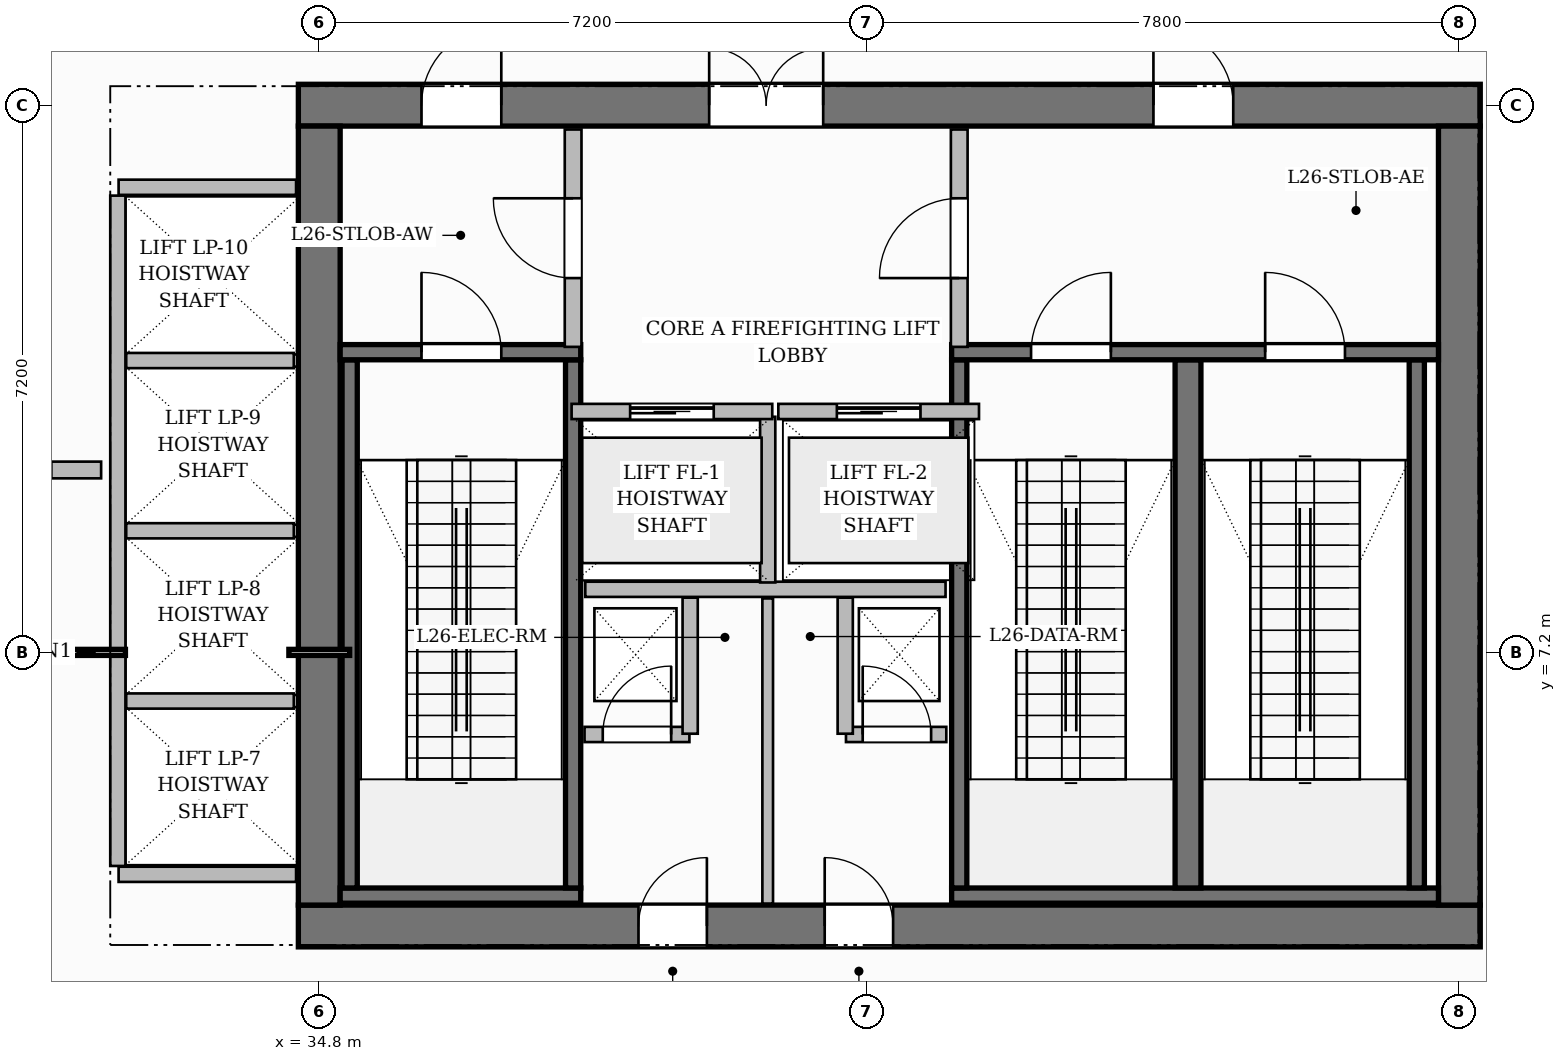
"""IFC4 building model, lengths in metres.
Left out: names, types, materials, properties, quantities, classifications, styles, units other than length and angle.
Written with IfcOpenShell. Run it as: python <this file> out.ifc"""

import sys

from ifc_helpers import new_model, si_unit, direction, frame, frame_2d, origin, place, context, subcontext, project, spatial, rectangle, extrude, source, transform, mapped, element, fill, save


model = new_model("IFC4")
c1 = context("Model", 3, precision=1e-05, world=origin(), true_north=direction((0.0, 1.0)))
c2 = subcontext(c1, "Body", "Model", "MODEL_VIEW")
j1 = project(units=[si_unit("LENGTHUNIT", "METRE"), si_unit("PLANEANGLEUNIT", "RADIAN")], contexts=[c1])
p1 = place(None, origin())
s1 = spatial("IfcSite", under=j1, at=p1, CompositionType="ELEMENT")
p2 = place(p1, origin())
s2 = spatial("IfcBuilding", under=s1, at=p2, CompositionType="ELEMENT")
p3 = place(p2, frame((0.0, 0.0, 106.4)))
s3 = spatial("IfcBuildingStorey", under=s2, at=p3, CompositionType="ELEMENT", Elevation=106.4)
p4 = place(p3, frame((34.525, 3.6, 0.0), z_axis=(0.0, 0.0, 1.0), x_axis=(1.0, 0.0, 0.0)))
e1 = element("IfcWall", 1, at=p4, inside=s3, PredefinedType="SHEAR", context=c2, shape_type="SweptSolid", body=[
    extrude(rectangle(XDim=15.55, YDim=0.55, at=frame_2d((7.775, 0.0))), origin(), (0.0, 0.0, 1.0), 5.4),
])
p5 = place(p4, frame((4.475, 0.0, 0.0)))
e2 = element("IfcOpeningElement", 2, at=p5, cuts=e1, PredefinedType="OPENING", context=c2, shape_type="SweptSolid", body=[
    extrude(rectangle(XDim=0.9, YDim=2.1, at=frame_2d((0.45, 1.05))), frame((0.0, 0.285, 0.0), z_axis=(0.0, -1.0, 0.0), x_axis=(1.0, 0.0, 0.0)), (0.0, 0.0, 1.0), 0.57),
])
p6 = place(p4, frame((6.925, 0.0, 0.0)))
e3 = element("IfcOpeningElement", 3, at=p6, cuts=e1, PredefinedType="OPENING", context=c2, shape_type="SweptSolid", body=[
    extrude(rectangle(XDim=0.9, YDim=2.1, at=frame_2d((0.45, 1.05))), frame((0.0, 0.285, 0.0), z_axis=(0.0, -1.0, 0.0), x_axis=(1.0, 0.0, 0.0)), (0.0, 0.0, 1.0), 0.57),
])
p7 = place(p3, frame((34.525, 14.4, 0.0), z_axis=(0.0, 0.0, 1.0), x_axis=(1.0, 0.0, 0.0)))
e4 = element("IfcWall", 4, at=p7, inside=s3, PredefinedType="SHEAR", context=c2, shape_type="SweptSolid", body=[
    extrude(rectangle(XDim=15.55, YDim=0.55, at=frame_2d((7.775, 0.0))), origin(), (0.0, 0.0, 1.0), 5.4),
])
p8 = place(p7, frame((5.405, 0.0, 0.0)))
e5 = element("IfcOpeningElement", 5, at=p8, cuts=e4, PredefinedType="OPENING", context=c2, shape_type="SweptSolid", body=[
    extrude(rectangle(XDim=1.5, YDim=2.2, at=frame_2d((0.75, 1.1))), frame((0.0, 0.285, 0.0), z_axis=(0.0, -1.0, 0.0), x_axis=(1.0, 0.0, 0.0)), (0.0, 0.0, 1.0), 0.57),
])
p9 = place(p7, frame((1.62, 0.0, 0.0)))
e6 = element("IfcOpeningElement", 6, at=p9, cuts=e4, PredefinedType="OPENING", context=c2, shape_type="SweptSolid", body=[
    extrude(rectangle(XDim=1.05, YDim=2.15, at=frame_2d((0.525, 1.075))), frame((0.0, 0.285, 0.0), z_axis=(0.0, -1.0, 0.0), x_axis=(1.0, 0.0, 0.0)), (0.0, 0.0, 1.0), 0.57),
])
p10 = place(p7, frame((11.25, 0.0, 0.0)))
e7 = element("IfcOpeningElement", 7, at=p10, cuts=e4, PredefinedType="OPENING", context=c2, shape_type="SweptSolid", body=[
    extrude(rectangle(XDim=1.05, YDim=2.15, at=frame_2d((0.525, 1.075))), frame((0.0, 0.285, 0.0), z_axis=(0.0, -1.0, 0.0), x_axis=(1.0, 0.0, 0.0)), (0.0, 0.0, 1.0), 0.57),
])
for number, where, z_axis, x_axis in (
    (8, (34.8, 3.875, 0.0), (0.0, 0.0, 1.0), (0.0, 1.0, 0.0)),
    (9, (49.8, 3.875, 0.0), (0.0, 0.0, 1.0), (0.0, 1.0, 0.0)),
):
    element("IfcWall", number, at=place(p3, frame(where, z_axis=z_axis, x_axis=x_axis)), inside=s3, PredefinedType="SHEAR", context=c2, shape_type="SweptSolid", body=[
        extrude(rectangle(XDim=10.25, YDim=0.55, at=frame_2d((5.125, 0.0))), origin(), (0.0, 0.0, 1.0), 5.4),
    ])
p11 = place(p3, frame((35.075, 4.0, 0.0), z_axis=(0.0, 0.0, 1.0), x_axis=(1.0, 0.0, 0.0)))
e10 = element("IfcWall", 10, at=p11, inside=s3, PredefinedType="SHEAR", context=c2, shape_type="SweptSolid", body=[
    extrude(rectangle(XDim=3.165, YDim=0.2, at=frame_2d((1.583, 0.0))), origin(), (0.0, 0.0, 1.0), 5.4),
])
for number, where, z_axis, x_axis in (
    (11, (35.2, 4.1, 0.0), (0.0, 0.0, 1.0), (0.0, 1.0, 0.0)),
    (12, (38.14, 4.1, 0.0), (0.0, 0.0, 1.0), (0.0, 1.0, 0.0)),
):
    element("IfcWall", number, at=place(p3, frame(where, z_axis=z_axis, x_axis=x_axis)), inside=s3, PredefinedType="SHEAR", context=c2, shape_type="SweptSolid", body=[
        extrude(rectangle(XDim=6.95, YDim=0.2, at=frame_2d((3.475, 0.0))), origin(), (0.0, 0.0, 1.0), 5.4),
    ])
p12 = place(p3, frame((35.075, 11.15, 0.0), z_axis=(0.0, 0.0, 1.0), x_axis=(1.0, 0.0, 0.0)))
e13 = element("IfcWall", 13, at=p12, inside=s3, PredefinedType="SHEAR", context=c2, shape_type="SweptSolid", body=[
    extrude(rectangle(XDim=3.165, YDim=0.2, at=frame_2d((1.583, 0.0))), origin(), (0.0, 0.0, 1.0), 5.4),
])
p13 = place(p12, frame((1.07, 0.0, 0.0)))
e14 = element("IfcOpeningElement", 14, at=p13, cuts=e13, PredefinedType="OPENING", context=c2, shape_type="SweptSolid", body=[
    extrude(rectangle(XDim=1.05, YDim=2.2, at=frame_2d((0.525, 1.1))), frame((0.0, 0.11, 0.0), z_axis=(0.0, -1.0, 0.0), x_axis=(1.0, 0.0, 0.0)), (0.0, 0.0, 1.0), 0.22),
])
p14 = place(p3, frame((43.12, 4.0, 0.0), z_axis=(0.0, 0.0, 1.0), x_axis=(1.0, 0.0, 0.0)))
e15 = element("IfcWall", 15, at=p14, inside=s3, PredefinedType="SHEAR", context=c2, shape_type="SweptSolid", body=[
    extrude(rectangle(XDim=6.405, YDim=0.2, at=frame_2d((3.202, 0.0))), origin(), (0.0, 0.0, 1.0), 5.4),
])
p15 = place(p3, frame((43.22, 4.1, 0.0), z_axis=(0.0, 0.0, 1.0), x_axis=(0.0, 1.0, 0.0)))
e16 = element("IfcWall", 16, at=p15, inside=s3, PredefinedType="SHEAR", context=c2, shape_type="SweptSolid", body=[
    extrude(rectangle(XDim=6.95, YDim=0.2, at=frame_2d((3.475, 0.0))), origin(), (0.0, 0.0, 1.0), 5.4),
])
p16 = place(p3, frame((46.23, 4.1, 0.0), z_axis=(0.0, 0.0, 1.0), x_axis=(0.0, 1.0, 0.0)))
e17 = element("IfcWall", 17, at=p16, inside=s3, PredefinedType="SHEAR", context=c2, shape_type="SweptSolid", body=[
    extrude(rectangle(XDim=6.95, YDim=0.34, at=frame_2d((3.475, 0.0))), origin(), (0.0, 0.0, 1.0), 5.4),
])
p17 = place(p3, frame((49.24, 4.1, 0.0), z_axis=(0.0, 0.0, 1.0), x_axis=(0.0, 1.0, 0.0)))
e18 = element("IfcWall", 18, at=p17, inside=s3, PredefinedType="SHEAR", context=c2, shape_type="SweptSolid", body=[
    extrude(rectangle(XDim=6.95, YDim=0.2, at=frame_2d((3.475, 0.0))), origin(), (0.0, 0.0, 1.0), 5.4),
])
p18 = place(p3, frame((43.12, 11.15, 0.0), z_axis=(0.0, 0.0, 1.0), x_axis=(1.0, 0.0, 0.0)))
e19 = element("IfcWall", 19, at=p18, inside=s3, PredefinedType="SHEAR", context=c2, shape_type="SweptSolid", body=[
    extrude(rectangle(XDim=6.405, YDim=0.2, at=frame_2d((3.202, 0.0))), origin(), (0.0, 0.0, 1.0), 5.4),
])
p19 = place(p18, frame((1.045, 0.0, 0.0)))
e20 = element("IfcOpeningElement", 20, at=p19, cuts=e19, PredefinedType="OPENING", context=c2, shape_type="SweptSolid", body=[
    extrude(rectangle(XDim=1.05, YDim=2.2, at=frame_2d((0.525, 1.1))), frame((0.0, 0.11, 0.0), z_axis=(0.0, -1.0, 0.0), x_axis=(1.0, 0.0, 0.0)), (0.0, 0.0, 1.0), 0.22),
])
p20 = place(p18, frame((4.125, 0.0, 0.0)))
e21 = element("IfcOpeningElement", 21, at=p20, cuts=e19, PredefinedType="OPENING", context=c2, shape_type="SweptSolid", body=[
    extrude(rectangle(XDim=1.05, YDim=2.2, at=frame_2d((0.525, 1.1))), frame((0.0, 0.11, 0.0), z_axis=(0.0, -1.0, 0.0), x_axis=(1.0, 0.0, 0.0)), (0.0, 0.0, 1.0), 0.22),
])
p21 = place(p3, frame((38.3, 8.03, 0.0), z_axis=(0.0, 0.0, 1.0), x_axis=(1.0, 0.0, 0.0)))
e22 = element("IfcWall", 22, at=p21, inside=s3, PredefinedType="PARTITIONING", context=c2, shape_type="SweptSolid", body=[
    extrude(rectangle(XDim=4.74, YDim=0.2, at=frame_2d((2.37, 0.0))), origin(), (0.0, 0.0, 1.0), 5.15),
])
p22 = place(p3, frame((40.7, 8.12, 0.0), z_axis=(0.0, 0.0, 1.0), x_axis=(0.0, 1.0, 0.0)))
e23 = element("IfcWall", 23, at=p22, inside=s3, PredefinedType="PARTITIONING", context=c2, shape_type="SweptSolid", body=[
    extrude(rectangle(XDim=2.18, YDim=0.2, at=frame_2d((1.09, 0.0))), origin(), (0.0, 0.0, 1.0), 5.15),
])
p23 = place(p3, frame((38.14, 11.22, 0.0), z_axis=(0.0, 0.0, 1.0), x_axis=(0.0, 1.0, 0.0)))
e24 = element("IfcWall", 24, at=p23, inside=s3, PredefinedType="PARTITIONING", context=c2, shape_type="SweptSolid", body=[
    extrude(rectangle(XDim=2.86, YDim=0.22, at=frame_2d((1.43, 0.0))), origin(), (0.0, 0.0, 1.0), 5.15),
])
p24 = place(p23, frame((0.905, 0.0, 0.0)))
e25 = element("IfcOpeningElement", 25, at=p24, cuts=e24, PredefinedType="OPENING", context=c2, shape_type="SweptSolid", body=[
    extrude(rectangle(XDim=1.05, YDim=2.15, at=frame_2d((0.525, 1.075))), frame((0.0, 0.12, 0.0), z_axis=(0.0, -1.0, 0.0), x_axis=(1.0, 0.0, 0.0)), (0.0, 0.0, 1.0), 0.24),
])
p25 = place(p3, frame((43.22, 11.22, 0.0), z_axis=(0.0, 0.0, 1.0), x_axis=(0.0, 1.0, 0.0)))
e26 = element("IfcWall", 26, at=p25, inside=s3, PredefinedType="PARTITIONING", context=c2, shape_type="SweptSolid", body=[
    extrude(rectangle(XDim=2.86, YDim=0.22, at=frame_2d((1.43, 0.0))), origin(), (0.0, 0.0, 1.0), 5.15),
])
p26 = place(p25, frame((0.905, 0.0, 0.0)))
e27 = element("IfcOpeningElement", 27, at=p26, cuts=e26, PredefinedType="OPENING", context=c2, shape_type="SweptSolid", body=[
    extrude(rectangle(XDim=1.05, YDim=2.15, at=frame_2d((0.525, 1.075))), frame((0.0, 0.12, 0.0), z_axis=(0.0, -1.0, 0.0), x_axis=(1.0, 0.0, 0.0)), (0.0, 0.0, 1.0), 0.24),
])
p27 = place(p3, frame((38.29, 6.12, 0.0), z_axis=(0.0, 0.0, 1.0), x_axis=(1.0, 0.0, 0.0)))
e28 = element("IfcWall", 28, at=p27, inside=s3, PredefinedType="PARTITIONING", context=c2, shape_type="SweptSolid", body=[
    extrude(rectangle(XDim=1.38, YDim=0.2, at=frame_2d((0.69, 0.0))), origin(), (0.0, 0.0, 1.0), 5.15),
])
p28 = place(p27, frame((0.24, 0.0, 0.0)))
e29 = element("IfcOpeningElement", 29, at=p28, cuts=e28, PredefinedType="OPENING", context=c2, shape_type="SweptSolid", body=[
    extrude(rectangle(XDim=0.9, YDim=2.1, at=frame_2d((0.45, 1.05))), frame((0.0, 0.11, 0.0), z_axis=(0.0, -1.0, 0.0), x_axis=(1.0, 0.0, 0.0)), (0.0, 0.0, 1.0), 0.22),
])
p29 = place(p3, frame((39.68, 6.13, 0.0), z_axis=(0.0, 0.0, 1.0), x_axis=(0.0, 1.0, 0.0)))
e30 = element("IfcWall", 30, at=p29, inside=s3, PredefinedType="PARTITIONING", context=c2, shape_type="SweptSolid", body=[
    extrude(rectangle(XDim=1.79, YDim=0.2, at=frame_2d((0.895, 0.0))), origin(), (0.0, 0.0, 1.0), 5.15),
])
p30 = place(p3, frame((41.73, 6.12, 0.0), z_axis=(0.0, 0.0, 1.0), x_axis=(1.0, 0.0, 0.0)))
e31 = element("IfcWall", 31, at=p30, inside=s3, PredefinedType="PARTITIONING", context=c2, shape_type="SweptSolid", body=[
    extrude(rectangle(XDim=1.32, YDim=0.2, at=frame_2d((0.66, 0.0))), origin(), (0.0, 0.0, 1.0), 5.15),
])
p31 = place(p30, frame((0.22, 0.0, 0.0)))
e32 = element("IfcOpeningElement", 32, at=p31, cuts=e31, PredefinedType="OPENING", context=c2, shape_type="SweptSolid", body=[
    extrude(rectangle(XDim=0.9, YDim=2.1, at=frame_2d((0.45, 1.05))), frame((0.0, 0.11, 0.0), z_axis=(0.0, -1.0, 0.0), x_axis=(1.0, 0.0, 0.0)), (0.0, 0.0, 1.0), 0.22),
])
p32 = place(p3, frame((41.72, 6.13, 0.0), z_axis=(0.0, 0.0, 1.0), x_axis=(0.0, 1.0, 0.0)))
e33 = element("IfcWall", 33, at=p32, inside=s3, PredefinedType="PARTITIONING", context=c2, shape_type="SweptSolid", body=[
    extrude(rectangle(XDim=1.79, YDim=0.2, at=frame_2d((0.895, 0.0))), origin(), (0.0, 0.0, 1.0), 5.15),
])
p33 = place(p3, frame((40.7, 3.895, 0.0), z_axis=(0.0, 0.0, 1.0), x_axis=(0.0, 1.0, 0.0)))
e34 = element("IfcWall", 34, at=p33, inside=s3, PredefinedType="PARTITIONING", context=c2, shape_type="SweptSolid", body=[
    extrude(rectangle(XDim=4.015, YDim=0.14, at=frame_2d((2.007, 0.0))), origin(), (0.0, 0.0, 1.0), 5.15),
])
for number, where, z_axis, x_axis in (
    (35, (32.16, 4.28, 0.0), (0.0, 0.0, 1.0), (1.0, 0.0, 0.0)),
    (36, (32.16, 13.32, 0.0), (0.0, 0.0, 1.0), (1.0, 0.0, 0.0)),
):
    element("IfcWall", number, at=place(p3, frame(where, z_axis=z_axis, x_axis=x_axis)), inside=s3, PredefinedType="PARTITIONING", context=c2, shape_type="SweptSolid", body=[
        extrude(rectangle(XDim=2.335, YDim=0.2, at=frame_2d((1.167, 0.0))), origin(), (0.0, 0.0, 1.0), 5.15),
    ])
p34 = place(p3, frame((32.15, 4.39, 0.0), z_axis=(0.0, 0.0, 1.0), x_axis=(0.0, 1.0, 0.0)))
e37 = element("IfcWall", 37, at=p34, inside=s3, PredefinedType="PARTITIONING", context=c2, shape_type="SweptSolid", body=[
    extrude(rectangle(XDim=8.82, YDim=0.2, at=frame_2d((4.41, 0.0))), origin(), (0.0, 0.0, 1.0), 5.15),
])
for number, where, z_axis, x_axis in (
    (38, (32.26, 6.56, 0.0), (0.0, 0.0, 1.0), (1.0, 0.0, 0.0)),
    (39, (32.26, 8.8, 0.0), (0.0, 0.0, 1.0), (1.0, 0.0, 0.0)),
    (40, (32.26, 11.04, 0.0), (0.0, 0.0, 1.0), (1.0, 0.0, 0.0)),
):
    element("IfcWall", number, at=place(p3, frame(where, z_axis=z_axis, x_axis=x_axis)), inside=s3, PredefinedType="PARTITIONING", context=c2, shape_type="SweptSolid", body=[
        extrude(rectangle(XDim=2.205, YDim=0.2, at=frame_2d((1.103, 0.0))), origin(), (0.0, 0.0, 1.0), 5.15),
    ])
p35 = place(p3, frame((14.558, 9.6, 0.0), z_axis=(0.0, 0.0, 1.0), x_axis=(1.0, 0.0, 0.0)))
e41 = element("IfcWall", 41, at=p35, inside=s3, PredefinedType="PARTITIONING", context=c2, shape_type="SweptSolid", body=[
    extrude(rectangle(XDim=17.372, YDim=0.22, at=frame_2d((8.686, 0.0))), origin(), (0.0, 0.0, 1.0), 5.15),
])
p36 = place(p35, frame((15.667, 0.0, 0.0)))
e42 = element("IfcOpeningElement", 42, at=p36, cuts=e41, PredefinedType="OPENING", context=c2, shape_type="SweptSolid", body=[
    extrude(rectangle(XDim=1.05, YDim=2.15, at=frame_2d((0.525, 1.075))), frame((0.0, 0.12, 0.0), z_axis=(0.0, -1.0, 0.0), x_axis=(1.0, 0.0, 0.0)), (0.0, 0.0, 1.0), 0.24),
])
p37 = place(p35, frame((8.192, 0.0, 0.0)))
e43 = element("IfcOpeningElement", 43, at=p37, cuts=e41, PredefinedType="OPENING", context=c2, shape_type="SweptSolid", body=[
    extrude(rectangle(XDim=1.5, YDim=2.2, at=frame_2d((0.75, 1.1))), frame((0.0, 0.12, 0.0), z_axis=(0.0, -1.0, 0.0), x_axis=(1.0, 0.0, 0.0)), (0.0, 0.0, 1.0), 0.24),
])
p38 = place(p3, frame((38.12, 10.37, 0.0), z_axis=(0.0, 0.0, 1.0), x_axis=(1.0, 0.0, 0.0)))
e44 = element("IfcWall", 44, at=p38, inside=s3, PredefinedType="PARTITIONING", context=c2, shape_type="SweptSolid", body=[
    extrude(rectangle(XDim=2.64, YDim=0.2, at=frame_2d((1.32, 0.0))), origin(), (0.0, 0.0, 1.0), 5.15),
])
p39 = place(p38, frame((0.77, 0.0, 0.0)))
e45 = element("IfcOpeningElement", 45, at=p39, cuts=e44, PredefinedType="OPENING", context=c2, shape_type="SweptSolid", body=[
    extrude(rectangle(XDim=1.1, YDim=2.2, at=frame_2d((0.55, 1.1))), frame((0.0, 0.11, 0.0), z_axis=(0.0, -1.0, 0.0), x_axis=(1.0, 0.0, 0.0)), (0.0, 0.0, 1.0), 0.22),
])
p40 = place(p3, frame((40.84, 10.37, 0.0), z_axis=(0.0, 0.0, 1.0), x_axis=(1.0, 0.0, 0.0)))
e46 = element("IfcWall", 46, at=p40, inside=s3, PredefinedType="PARTITIONING", context=c2, shape_type="SweptSolid", body=[
    extrude(rectangle(XDim=2.64, YDim=0.2, at=frame_2d((1.32, 0.0))), origin(), (0.0, 0.0, 1.0), 5.15),
])
p41 = place(p40, frame((0.77, 0.0, 0.0)))
e47 = element("IfcOpeningElement", 47, at=p41, cuts=e46, PredefinedType="OPENING", context=c2, shape_type="SweptSolid", body=[
    extrude(rectangle(XDim=1.1, YDim=2.2, at=frame_2d((0.55, 1.1))), frame((0.0, 0.11, 0.0), z_axis=(0.0, -1.0, 0.0), x_axis=(1.0, 0.0, 0.0)), (0.0, 0.0, 1.0), 0.22),
])
m1 = source(origin(), c2, "Body", "SweptSolid", [
    extrude(rectangle(XDim=1.05, YDim=2.2, at=frame_2d((0.525, 1.1))), frame((0.0, 0.025, 0.0), z_axis=(0.0, -1.0, 0.0), x_axis=(1.0, 0.0, 0.0)), (0.0, 0.0, 1.0), 0.05),
])
p42 = place(p13, origin())
e48 = element("IfcDoor", 48, at=p42, inside=s3, OperationType="SINGLE_SWING_LEFT", PredefinedType="DOOR", context=c2, shape_type="MappedRepresentation", body=[
    mapped(m1, transform((0.0, 0.0, 0.0), scale=1.0)),
])
fill(e14, e48)
p43 = place(p19, origin())
e49 = element("IfcDoor", 49, at=p43, inside=s3, OperationType="SINGLE_SWING_RIGHT", PredefinedType="DOOR", context=c2, shape_type="MappedRepresentation", body=[
    mapped(m1, transform((0.0, 0.0, 0.0), scale=1.0)),
])
fill(e20, e49)
p44 = place(p20, origin())
e50 = element("IfcDoor", 50, at=p44, inside=s3, OperationType="SINGLE_SWING_LEFT", PredefinedType="DOOR", context=c2, shape_type="MappedRepresentation", body=[
    mapped(m1, transform((0.0, 0.0, 0.0), scale=1.0)),
])
fill(e21, e50)
m2 = source(origin(), c2, "Body", "SweptSolid", [
    extrude(rectangle(XDim=1.05, YDim=2.15, at=frame_2d((0.525, 1.075))), frame((0.0, 0.025, 0.0), z_axis=(0.0, -1.0, 0.0), x_axis=(1.0, 0.0, 0.0)), (0.0, 0.0, 1.0), 0.05),
])
p45 = place(p24, origin())
e51 = element("IfcDoor", 51, at=p45, inside=s3, OperationType="SINGLE_SWING_RIGHT", PredefinedType="DOOR", context=c2, shape_type="MappedRepresentation", body=[
    mapped(m2, transform((0.0, 0.0, 0.0), scale=1.0)),
])
fill(e25, e51)
p46 = place(p26, origin())
e52 = element("IfcDoor", 52, at=p46, inside=s3, OperationType="SINGLE_SWING_LEFT", PredefinedType="DOOR", context=c2, shape_type="MappedRepresentation", body=[
    mapped(m2, transform((0.0, 0.0, 0.0), scale=1.0)),
])
fill(e27, e52)
m3 = source(origin(), c2, "Body", "SweptSolid", [
    extrude(rectangle(XDim=1.5, YDim=2.2, at=frame_2d((0.75, 1.1))), frame((0.0, 0.025, 0.0), z_axis=(0.0, -1.0, 0.0), x_axis=(1.0, 0.0, 0.0)), (0.0, 0.0, 1.0), 0.05),
])
p47 = place(p8, origin())
e53 = element("IfcDoor", 53, at=p47, inside=s3, OperationType="DOUBLE_DOOR_SINGLE_SWING", PredefinedType="DOOR", context=c2, shape_type="MappedRepresentation", body=[
    mapped(m3, transform((0.0, 0.0, 0.0), scale=1.0)),
])
fill(e5, e53)
p48 = place(p9, origin())
e54 = element("IfcDoor", 54, at=p48, inside=s3, OperationType="SINGLE_SWING_RIGHT", PredefinedType="DOOR", context=c2, shape_type="MappedRepresentation", body=[
    mapped(m2, transform((0.0, 0.0, 0.0), scale=1.0)),
])
fill(e6, e54)
p49 = place(p10, origin())
e55 = element("IfcDoor", 55, at=p49, inside=s3, OperationType="SINGLE_SWING_LEFT", PredefinedType="DOOR", context=c2, shape_type="MappedRepresentation", body=[
    mapped(m2, transform((0.0, 0.0, 0.0), scale=1.0)),
])
fill(e7, e55)
m4 = source(origin(), c2, "Body", "SweptSolid", [
    extrude(rectangle(XDim=0.9, YDim=2.1, at=frame_2d((0.45, 1.05))), frame((0.0, 0.025, 0.0), z_axis=(0.0, -1.0, 0.0), x_axis=(1.0, 0.0, 0.0)), (0.0, 0.0, 1.0), 0.05),
])
p50 = place(p28, origin())
e56 = element("IfcDoor", 56, at=p50, inside=s3, OperationType="SINGLE_SWING_RIGHT", PredefinedType="DOOR", context=c2, shape_type="MappedRepresentation", body=[
    mapped(m4, transform((0.0, 0.0, 0.0), scale=1.0)),
])
fill(e29, e56)
p51 = place(p31, origin())
e57 = element("IfcDoor", 57, at=p51, inside=s3, OperationType="SINGLE_SWING_LEFT", PredefinedType="DOOR", context=c2, shape_type="MappedRepresentation", body=[
    mapped(m4, transform((0.0, 0.0, 0.0), scale=1.0)),
])
fill(e32, e57)
p52 = place(p5, origin())
e58 = element("IfcDoor", 58, at=p52, inside=s3, OperationType="SINGLE_SWING_RIGHT", PredefinedType="DOOR", context=c2, shape_type="MappedRepresentation", body=[
    mapped(m4, transform((0.0, 0.0, 0.0), scale=1.0)),
])
fill(e2, e58)
p53 = place(p6, origin())
e59 = element("IfcDoor", 59, at=p53, inside=s3, OperationType="SINGLE_SWING_LEFT", PredefinedType="DOOR", context=c2, shape_type="MappedRepresentation", body=[
    mapped(m4, transform((0.0, 0.0, 0.0), scale=1.0)),
])
fill(e3, e59)
m5 = source(origin(), c2, "Body", "SweptSolid", [
    extrude(rectangle(XDim=1.1, YDim=2.2, at=frame_2d((0.55, 1.1))), frame((0.0, 0.025, 0.0), z_axis=(0.0, -1.0, 0.0), x_axis=(1.0, 0.0, 0.0)), (0.0, 0.0, 1.0), 0.05),
])
p54 = place(p39, origin())
e60 = element("IfcDoor", 60, at=p54, inside=s3, OperationType="SLIDING_TO_LEFT", PredefinedType="DOOR", context=c2, shape_type="MappedRepresentation", body=[
    mapped(m5, transform((0.0, 0.0, 0.0), scale=1.0)),
])
fill(e45, e60)
p55 = place(p41, origin())
e61 = element("IfcDoor", 61, at=p55, inside=s3, OperationType="SLIDING_TO_LEFT", PredefinedType="DOOR", context=c2, shape_type="MappedRepresentation", body=[
    mapped(m5, transform((0.0, 0.0, 0.0), scale=1.0)),
])
fill(e47, e61)
save(model, sys.argv[1])
